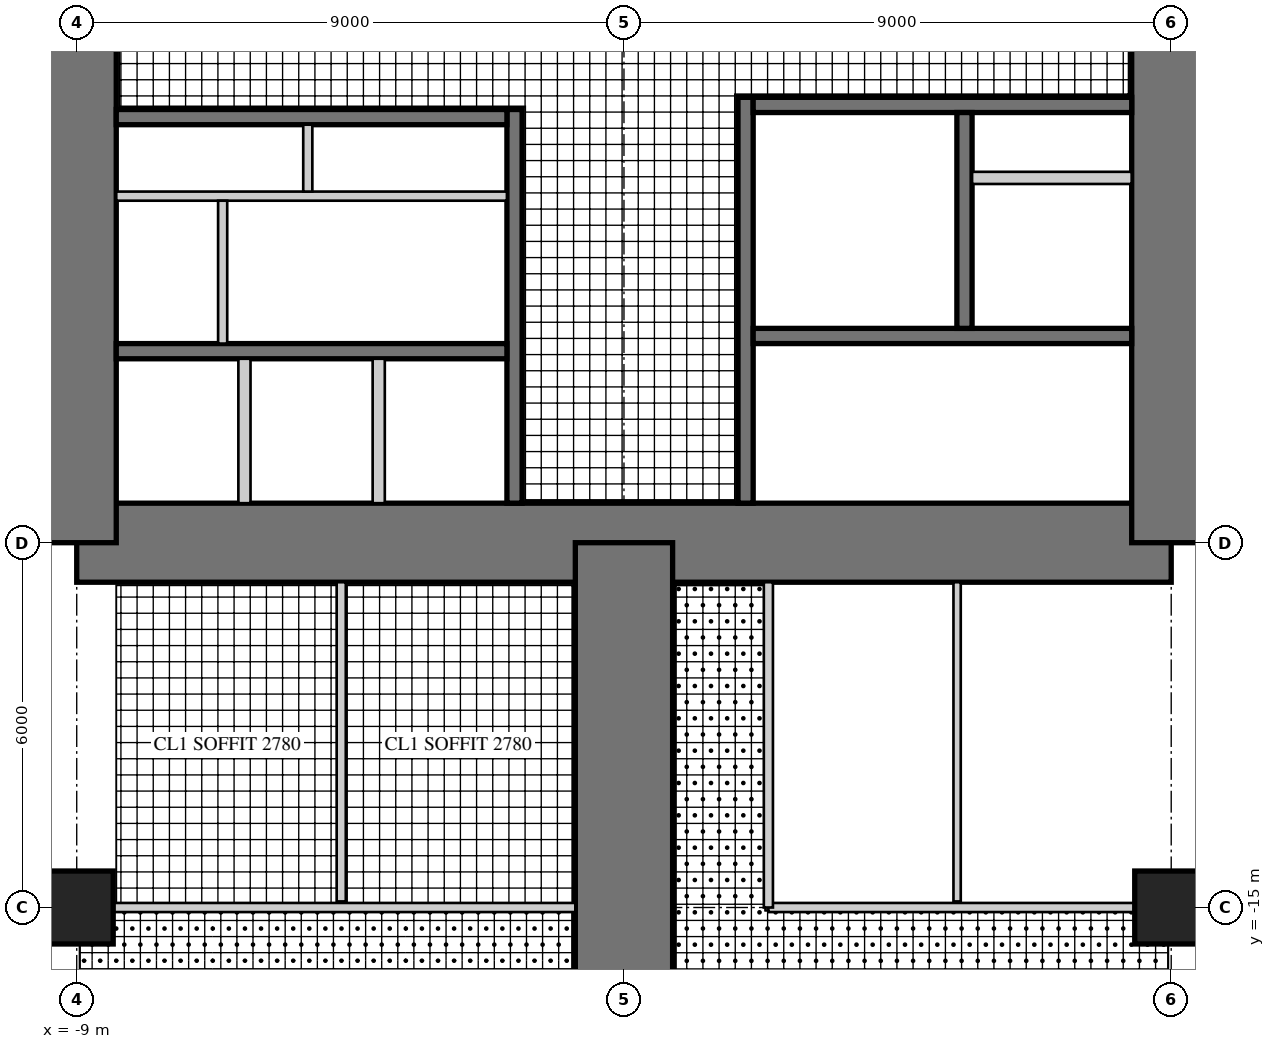
"""IFC4 building model, lengths in metres.
Left out: names, types, materials, properties, quantities, classifications, styles, units other than length and angle.
Written with IfcOpenShell. Run it as: python <this file> out.ifc"""

import sys

from ifc_helpers import new_model, si_unit, direction, frame, frame_2d, origin, origin_2d, place, context, subcontext, project, spatial, rectangle, extrude, element, fill, save


model = new_model("IFC4")
c1 = context("Model", 3, precision=1e-05, world=origin(), true_north=direction((0.0, 1.0)))
c2 = subcontext(c1, "Body", "Model", "MODEL_VIEW")
j1 = project(units=[si_unit("LENGTHUNIT", "METRE"), si_unit("PLANEANGLEUNIT", "RADIAN")], contexts=[c1])
p1 = place(None, origin())
s1 = spatial("IfcSite", under=j1, at=p1, CompositionType="ELEMENT")
p2 = place(p1, origin())
s2 = spatial("IfcBuilding", under=s1, at=p2, CompositionType="ELEMENT")
p3 = place(p2, frame((0.0, 0.0, 35.5)))
s3 = spatial("IfcBuildingStorey", under=s2, at=p3, CompositionType="ELEMENT", Elevation=35.5)
p4 = place(p3, frame((-9.0, -9.0, 0.0), z_axis=(0.0, 0.0, 1.0), x_axis=(1.0, 0.0, 0.0)))
e1 = element("IfcWall", 1, at=p4, inside=s3, PredefinedType="SHEAR", context=c2, shape_type="SweptSolid", body=[
    extrude(rectangle(XDim=18.0, YDim=1.3, at=frame_2d((9.0, 0.0))), origin(), (0.0, 0.0, 1.0), 4.0),
])
p5 = place(p4, frame((9.8, 0.0, 0.0)))
e2 = element("IfcOpeningElement", 2, at=p5, cuts=e1, PredefinedType="OPENING", context=c2, shape_type="SweptSolid", body=[
    extrude(rectangle(XDim=1.0, YDim=2.4, at=frame_2d((0.5, 1.2))), frame((0.0, 0.66, 0.0), z_axis=(0.0, -1.0, 0.0), x_axis=(1.0, 0.0, 0.0)), (0.0, 0.0, 1.0), 1.32),
])
p6 = place(p3, frame((9.0, -9.0, 0.0), z_axis=(0.0, 0.0, 1.0), x_axis=(0.0, 1.0, 0.0)))
e3 = element("IfcWall", 3, at=p6, inside=s3, PredefinedType="SHEAR", context=c2, shape_type="SweptSolid", body=[
    extrude(rectangle(XDim=18.0, YDim=1.3, at=frame_2d((9.0, 0.0))), origin(), (0.0, 0.0, 1.0), 4.0),
])
p7 = place(p6, frame((9.8, 0.0, 0.0)))
e4 = element("IfcOpeningElement", 4, at=p7, cuts=e3, PredefinedType="OPENING", context=c2, shape_type="SweptSolid", body=[
    extrude(rectangle(XDim=1.0, YDim=2.4, at=frame_2d((0.5, 1.2))), frame((0.0, 0.66, 0.0), z_axis=(0.0, -1.0, 0.0), x_axis=(1.0, 0.0, 0.0)), (0.0, 0.0, 1.0), 1.32),
])
p8 = place(p3, frame((-9.0, 9.0, 0.0), z_axis=(0.0, 0.0, 1.0), x_axis=(0.0, -1.0, 0.0)))
e5 = element("IfcWall", 5, at=p8, inside=s3, PredefinedType="SHEAR", context=c2, shape_type="SweptSolid", body=[
    extrude(rectangle(XDim=18.0, YDim=1.3, at=frame_2d((9.0, 0.0))), origin(), (0.0, 0.0, 1.0), 4.0),
])
p9 = place(p8, frame((9.8, 0.0, 0.0)))
e6 = element("IfcOpeningElement", 6, at=p9, cuts=e5, PredefinedType="OPENING", context=c2, shape_type="SweptSolid", body=[
    extrude(rectangle(XDim=1.0, YDim=2.4, at=frame_2d((0.5, 1.2))), frame((0.0, 0.66, 0.0), z_axis=(0.0, -1.0, 0.0), x_axis=(1.0, 0.0, 0.0)), (0.0, 0.0, 1.0), 1.32),
])
p10 = place(p3, frame((-1.8, -1.875, 0.0), z_axis=(0.0, 0.0, 1.0), x_axis=(0.0, -1.0, 0.0)))
e7 = element("IfcWall", 7, at=p10, inside=s3, PredefinedType="SHEAR", context=c2, shape_type="SweptSolid", body=[
    extrude(rectangle(XDim=6.475, YDim=0.25, at=frame_2d((3.238, 0.0))), origin(), (0.0, 0.0, 1.0), 4.0),
])
p11 = place(p10, frame((1.875, 0.0, 0.0)))
e8 = element("IfcOpeningElement", 8, at=p11, cuts=e7, PredefinedType="OPENING", context=c2, shape_type="SweptSolid", body=[
    extrude(rectangle(XDim=1.6, YDim=2.4, at=frame_2d((0.8, 1.2))), frame((0.0, 0.135, 0.0), z_axis=(0.0, -1.0, 0.0), x_axis=(1.0, 0.0, 0.0)), (0.0, 0.0, 1.0), 0.27),
])
for number, where, z_axis, x_axis in (
    (9, (-1.925, -2.0, 0.0), (0.0, 0.0, 1.0), (-1.0, 0.0, 0.0)),
    (10, (-1.925, -5.85, 0.0), (0.0, 0.0, 1.0), (-1.0, 0.0, 0.0)),
):
    element("IfcWall", number, at=place(p3, frame(where, z_axis=z_axis, x_axis=x_axis)), inside=s3, PredefinedType="SHEAR", context=c2, shape_type="SweptSolid", body=[
        extrude(rectangle(XDim=6.425, YDim=0.25, at=frame_2d((3.212, 0.0))), origin(), (0.0, 0.0, 1.0), 4.0),
    ])
p12 = place(p3, frame((-1.925, -3.3, 0.0), z_axis=(0.0, 0.0, 1.0), x_axis=(-1.0, 0.0, 0.0)))
e11 = element("IfcWall", 11, at=p12, inside=s3, PredefinedType="PARTITIONING", context=c2, shape_type="SweptSolid", body=[
    extrude(rectangle(XDim=6.425, YDim=0.15, at=frame_2d((3.212, 0.0))), origin(), (0.0, 0.0, 1.0), 4.0),
])
p13 = place(p12, frame((0.075, 0.0, 0.0)))
e12 = element("IfcOpeningElement", 12, at=p13, cuts=e11, PredefinedType="OPENING", context=c2, shape_type="SweptSolid", body=[
    extrude(rectangle(XDim=0.8, YDim=2.1, at=frame_2d((0.4, 1.05))), frame((0.0, 0.085, 0.0), z_axis=(0.0, -1.0, 0.0), x_axis=(1.0, 0.0, 0.0)), (0.0, 0.0, 1.0), 0.17),
])
p14 = place(p12, frame((3.675, 0.0, 0.0)))
e13 = element("IfcOpeningElement", 13, at=p14, cuts=e11, PredefinedType="OPENING", context=c2, shape_type="SweptSolid", body=[
    extrude(rectangle(XDim=0.8, YDim=2.1, at=frame_2d((0.4, 1.05))), frame((0.0, 0.085, 0.0), z_axis=(0.0, -1.0, 0.0), x_axis=(1.0, 0.0, 0.0)), (0.0, 0.0, 1.0), 0.17),
])
p15 = place(p3, frame((-5.2, -2.125, 0.0), z_axis=(0.0, 0.0, 1.0), x_axis=(0.0, -1.0, 0.0)))
e14 = element("IfcWall", 14, at=p15, inside=s3, PredefinedType="PARTITIONING", context=c2, shape_type="SweptSolid", body=[
    extrude(rectangle(XDim=1.1, YDim=0.15, at=frame_2d((0.55, 0.0))), origin(), (0.0, 0.0, 1.0), 4.0),
])
for number, where, z_axis, x_axis in (
    (15, (-4.033, -5.975, 0.0), (0.0, 0.0, 1.0), (0.0, -1.0, 0.0)),
    (16, (-6.242, -5.975, 0.0), (0.0, 0.0, 1.0), (0.0, -1.0, 0.0)),
):
    element("IfcWall", number, at=place(p3, frame(where, z_axis=z_axis, x_axis=x_axis)), inside=s3, PredefinedType="PARTITIONING", context=c2, shape_type="SweptSolid", body=[
        extrude(rectangle(XDim=2.375, YDim=0.2, at=frame_2d((1.188, 0.0))), origin(), (0.0, 0.0, 1.0), 4.0),
    ])
p16 = place(p3, frame((2.0, -1.675, 0.0), z_axis=(0.0, 0.0, 1.0), x_axis=(0.0, -1.0, 0.0)))
e17 = element("IfcWall", 17, at=p16, inside=s3, PredefinedType="SHEAR", context=c2, shape_type="SweptSolid", body=[
    extrude(rectangle(XDim=6.675, YDim=0.25, at=frame_2d((3.337, 0.0))), origin(), (0.0, 0.0, 1.0), 4.0),
])
p17 = place(p16, frame((0.725, 0.0, 0.0)))
e18 = element("IfcOpeningElement", 18, at=p17, cuts=e17, PredefinedType="OPENING", context=c2, shape_type="SweptSolid", body=[
    extrude(rectangle(XDim=1.0, YDim=2.1, at=frame_2d((0.5, 1.05))), frame((0.0, 0.135, 0.0), z_axis=(0.0, -1.0, 0.0), x_axis=(1.0, 0.0, 0.0)), (0.0, 0.0, 1.0), 0.27),
])
p18 = place(p3, frame((2.125, -1.8, 0.0), z_axis=(0.0, 0.0, 1.0), x_axis=(1.0, 0.0, 0.0)))
e19 = element("IfcWall", 19, at=p18, inside=s3, PredefinedType="SHEAR", context=c2, shape_type="SweptSolid", body=[
    extrude(rectangle(XDim=6.225, YDim=0.25, at=frame_2d((3.113, 0.0))), origin(), (0.0, 0.0, 1.0), 4.0),
])
p19 = place(p3, frame((2.125, -5.6, 0.0), z_axis=(0.0, 0.0, 1.0), x_axis=(1.0, 0.0, 0.0)))
e20 = element("IfcWall", 20, at=p19, inside=s3, PredefinedType="SHEAR", context=c2, shape_type="SweptSolid", body=[
    extrude(rectangle(XDim=6.225, YDim=0.25, at=frame_2d((3.113, 0.0))), origin(), (0.0, 0.0, 1.0), 4.0),
])
p20 = place(p19, frame((0.175, 0.0, 0.0)))
e21 = element("IfcOpeningElement", 21, at=p20, cuts=e20, PredefinedType="OPENING", context=c2, shape_type="SweptSolid", body=[
    extrude(rectangle(XDim=1.0, YDim=2.1, at=frame_2d((0.5, 1.05))), frame((0.0, 0.135, 0.0), z_axis=(0.0, -1.0, 0.0), x_axis=(1.0, 0.0, 0.0)), (0.0, 0.0, 1.0), 0.27),
])
p21 = place(p3, frame((5.6, -1.925, 0.0), z_axis=(0.0, 0.0, 1.0), x_axis=(0.0, -1.0, 0.0)))
e22 = element("IfcWall", 22, at=p21, inside=s3, PredefinedType="SHEAR", context=c2, shape_type="SweptSolid", body=[
    extrude(rectangle(XDim=3.55, YDim=0.25, at=frame_2d((1.775, 0.0))), origin(), (0.0, 0.0, 1.0), 4.0),
])
p22 = place(p21, frame((1.525, 0.0, 0.0)))
e23 = element("IfcOpeningElement", 23, at=p22, cuts=e22, PredefinedType="OPENING", context=c2, shape_type="SweptSolid", body=[
    extrude(rectangle(XDim=1.1, YDim=2.2, at=frame_2d((0.55, 1.1))), frame((0.0, 0.135, 0.0), z_axis=(0.0, -1.0, 0.0), x_axis=(1.0, 0.0, 0.0)), (0.0, 0.0, 1.0), 0.27),
])
p23 = place(p21, frame((0.075, 0.0, 0.0)))
e24 = element("IfcOpeningElement", 24, at=p23, cuts=e22, PredefinedType="OPENING", context=c2, shape_type="SweptSolid", body=[
    extrude(rectangle(XDim=0.8, YDim=2.1, at=frame_2d((0.4, 1.05))), frame((0.0, 0.135, 0.0), z_axis=(0.0, -1.0, 0.0), x_axis=(1.0, 0.0, 0.0)), (0.0, 0.0, 1.0), 0.27),
])
p24 = place(p3, frame((5.725, -3.0, 0.0), z_axis=(0.0, 0.0, 1.0), x_axis=(1.0, 0.0, 0.0)))
e25 = element("IfcWall", 25, at=p24, inside=s3, PredefinedType="PARTITIONING", context=c2, shape_type="SweptSolid", body=[
    extrude(rectangle(XDim=2.625, YDim=0.2, at=frame_2d((1.312, 0.0))), origin(), (0.0, 0.0, 1.0), 4.0),
])
p25 = place(p3, frame((0.0, -9.0, 0.0), z_axis=(0.0, 0.0, 1.0), x_axis=(0.0, -1.0, 0.0)))
e26 = element("IfcWall", 26, at=p25, inside=s3, PredefinedType="SHEAR", context=c2, shape_type="SweptSolid", body=[
    extrude(rectangle(XDim=18.0, YDim=1.6, at=frame_2d((9.0, 0.0))), origin(), (0.0, 0.0, 1.0), 4.0),
])
p26 = place(p25, frame((9.9, 0.0, 0.0)))
e27 = element("IfcOpeningElement", 27, at=p26, cuts=e26, PredefinedType="OPENING", context=c2, shape_type="SweptSolid", body=[
    extrude(rectangle(XDim=1.0, YDim=2.2, at=frame_2d((0.5, 1.1))), frame((0.0, 0.81, 0.0), z_axis=(0.0, -1.0, 0.0), x_axis=(1.0, 0.0, 0.0)), (0.0, 0.0, 1.0), 1.62),
])
for number, where, z_axis, x_axis in (
    (28, (-9.0, -15.0, 0.0), (0.0, 0.0, 1.0), (1.0, 0.0, 0.0)),
    (29, (9.0, -15.0, 0.0), (0.0, 0.0, 1.0), (1.0, 0.0, 0.0)),
):
    element("IfcColumn", number, at=place(p3, frame(where, z_axis=z_axis, x_axis=x_axis)), inside=s3, PredefinedType="COLUMN", context=c2, shape_type="SweptSolid", body=[
        extrude(rectangle(XDim=1.2, YDim=1.2, at=origin_2d()), origin(), (0.0, 0.0, 1.0), 4.0),
    ])
p27 = place(p3, frame((-6.6, -3.375, 0.0), z_axis=(0.0, 0.0, 1.0), x_axis=(0.0, -1.0, 0.0)))
e30 = element("IfcWall", 30, at=p27, inside=s3, PredefinedType="PARTITIONING", context=c2, shape_type="SweptSolid", body=[
    extrude(rectangle(XDim=2.35, YDim=0.15, at=frame_2d((1.175, 0.0))), origin(), (0.0, 0.0, 1.0), 3.8),
])
p28 = place(p27, frame((0.45, 0.0, 0.0)))
e31 = element("IfcOpeningElement", 31, at=p28, cuts=e30, PredefinedType="OPENING", context=c2, shape_type="SweptSolid", body=[
    extrude(rectangle(XDim=1.0, YDim=2.1, at=frame_2d((0.5, 1.05))), frame((0.0, 0.085, 0.0), z_axis=(0.0, -1.0, 0.0), x_axis=(1.0, 0.0, 0.0)), (0.0, 0.0, 1.0), 0.17),
])
p29 = place(p3, frame((2.375, -15.0, 0.0), z_axis=(0.0, 0.0, 1.0), x_axis=(1.0, 0.0, 0.0)))
e32 = element("IfcWall", 32, at=p29, inside=s3, PredefinedType="PARTITIONING", context=c2, shape_type="SweptSolid", body=[
    extrude(rectangle(XDim=6.025, YDim=0.15, at=frame_2d((3.012, 0.0))), origin(), (0.0, 0.0, 1.0), 2.95),
])
p30 = place(p29, frame((1.052, 0.0, 0.0)))
e33 = element("IfcOpeningElement", 33, at=p30, cuts=e32, PredefinedType="OPENING", context=c2, shape_type="SweptSolid", body=[
    extrude(rectangle(XDim=1.0, YDim=2.1, at=frame_2d((0.5, 1.05))), frame((0.0, 0.085, 0.0), z_axis=(0.0, -1.0, 0.0), x_axis=(1.0, 0.0, 0.0)), (0.0, 0.0, 1.0), 0.17),
])
p31 = place(p29, frame((4.064, 0.0, 0.0)))
e34 = element("IfcOpeningElement", 34, at=p31, cuts=e32, PredefinedType="OPENING", context=c2, shape_type="SweptSolid", body=[
    extrude(rectangle(XDim=1.0, YDim=2.1, at=frame_2d((0.5, 1.05))), frame((0.0, 0.085, 0.0), z_axis=(0.0, -1.0, 0.0), x_axis=(1.0, 0.0, 0.0)), (0.0, 0.0, 1.0), 0.17),
])
p32 = place(p3, frame((2.375, -9.65, 0.0), z_axis=(0.0, 0.0, 1.0), x_axis=(0.0, -1.0, 0.0)))
e35 = element("IfcWall", 35, at=p32, inside=s3, PredefinedType="PARTITIONING", context=c2, shape_type="SweptSolid", body=[
    extrude(rectangle(XDim=5.35, YDim=0.15, at=frame_2d((2.675, 0.0))), origin(), (0.0, 0.0, 1.0), 3.8),
])
p33 = place(p3, frame((5.479, -9.65, 0.0), z_axis=(0.0, 0.0, 1.0), x_axis=(0.0, -1.0, 0.0)))
e36 = element("IfcWall", 36, at=p33, inside=s3, PredefinedType="PLUMBINGWALL", context=c2, shape_type="SweptSolid", body=[
    extrude(rectangle(XDim=5.25, YDim=0.12, at=frame_2d((2.625, 0.0))), origin(), (0.0, 0.0, 1.0), 3.8),
])
p34 = place(p3, frame((-8.4, -15.0, 0.0), z_axis=(0.0, 0.0, 1.0), x_axis=(1.0, 0.0, 0.0)))
e37 = element("IfcWall", 37, at=p34, inside=s3, PredefinedType="PARTITIONING", context=c2, shape_type="SweptSolid", body=[
    extrude(rectangle(XDim=7.6, YDim=0.15, at=frame_2d((3.8, 0.0))), origin(), (0.0, 0.0, 1.0), 2.95),
])
p35 = place(p34, frame((1.375, 0.0, 0.0)))
e38 = element("IfcOpeningElement", 38, at=p35, cuts=e37, PredefinedType="OPENING", context=c2, shape_type="SweptSolid", body=[
    extrude(rectangle(XDim=1.0, YDim=2.1, at=frame_2d((0.5, 1.05))), frame((0.0, 0.085, 0.0), z_axis=(0.0, -1.0, 0.0), x_axis=(1.0, 0.0, 0.0)), (0.0, 0.0, 1.0), 0.17),
])
p36 = place(p34, frame((5.175, 0.0, 0.0)))
e39 = element("IfcOpeningElement", 39, at=p36, cuts=e37, PredefinedType="OPENING", context=c2, shape_type="SweptSolid", body=[
    extrude(rectangle(XDim=1.0, YDim=2.1, at=frame_2d((0.5, 1.05))), frame((0.0, 0.085, 0.0), z_axis=(0.0, -1.0, 0.0), x_axis=(1.0, 0.0, 0.0)), (0.0, 0.0, 1.0), 0.17),
])
p37 = place(p3, frame((-4.65, -9.65, 0.0), z_axis=(0.0, 0.0, 1.0), x_axis=(0.0, -1.0, 0.0)))
e40 = element("IfcWall", 40, at=p37, inside=s3, PredefinedType="PARTITIONING", context=c2, shape_type="SweptSolid", body=[
    extrude(rectangle(XDim=5.25, YDim=0.15, at=frame_2d((2.625, 0.0))), origin(), (0.0, 0.0, 1.0), 3.8),
])
p38 = place(p28, frame((1.0, 0.0, 0.0), z_axis=(0.0, 0.0, 1.0), x_axis=(-1.0, 0.0, 0.0)))
e41 = element("IfcDoor", 41, at=p38, inside=s3, OperationType="SINGLE_SWING_RIGHT", PredefinedType="DOOR", context=c2, shape_type="SweptSolid", body=[
    extrude(rectangle(XDim=1.0, YDim=2.1, at=frame_2d((0.5, 1.05))), frame((0.0, 0.025, 0.0), z_axis=(0.0, -1.0, 0.0), x_axis=(1.0, 0.0, 0.0)), (0.0, 0.0, 1.0), 0.05),
])
fill(e31, e41)
p39 = place(p30, origin())
e42 = element("IfcDoor", 42, at=p39, inside=s3, OperationType="SINGLE_SWING_LEFT", PredefinedType="DOOR", context=c2, shape_type="SweptSolid", body=[
    extrude(rectangle(XDim=1.0, YDim=2.1, at=frame_2d((0.5, 1.05))), frame((0.0, 0.025, 0.0), z_axis=(0.0, -1.0, 0.0), x_axis=(1.0, 0.0, 0.0)), (0.0, 0.0, 1.0), 0.05),
])
fill(e33, e42)
p40 = place(p31, origin())
e43 = element("IfcDoor", 43, at=p40, inside=s3, OperationType="SINGLE_SWING_LEFT", PredefinedType="DOOR", context=c2, shape_type="SweptSolid", body=[
    extrude(rectangle(XDim=1.0, YDim=2.1, at=frame_2d((0.5, 1.05))), frame((0.0, 0.025, 0.0), z_axis=(0.0, -1.0, 0.0), x_axis=(1.0, 0.0, 0.0)), (0.0, 0.0, 1.0), 0.05),
])
fill(e34, e43)
p41 = place(p35, origin())
e44 = element("IfcDoor", 44, at=p41, inside=s3, OperationType="SINGLE_SWING_RIGHT", PredefinedType="DOOR", context=c2, shape_type="SweptSolid", body=[
    extrude(rectangle(XDim=1.0, YDim=2.1, at=frame_2d((0.5, 1.05))), frame((0.0, 0.025, 0.0), z_axis=(0.0, -1.0, 0.0), x_axis=(1.0, 0.0, 0.0)), (0.0, 0.0, 1.0), 0.05),
])
fill(e38, e44)
p42 = place(p36, origin())
e45 = element("IfcDoor", 45, at=p42, inside=s3, OperationType="SINGLE_SWING_LEFT", PredefinedType="DOOR", context=c2, shape_type="SweptSolid", body=[
    extrude(rectangle(XDim=1.0, YDim=2.1, at=frame_2d((0.5, 1.05))), frame((0.0, 0.025, 0.0), z_axis=(0.0, -1.0, 0.0), x_axis=(1.0, 0.0, 0.0)), (0.0, 0.0, 1.0), 0.05),
])
fill(e39, e45)
p43 = place(p5, frame((1.0, 0.0, 0.0), z_axis=(0.0, 0.0, 1.0), x_axis=(-1.0, 0.0, 0.0)))
e46 = element("IfcDoor", 46, at=p43, inside=s3, OperationType="SINGLE_SWING_RIGHT", PredefinedType="DOOR", context=c2, shape_type="SweptSolid", body=[
    extrude(rectangle(XDim=1.0, YDim=2.4, at=frame_2d((0.5, 1.2))), frame((0.0, -0.005, 0.0), z_axis=(0.0, -1.0, 0.0), x_axis=(1.0, 0.0, 0.0)), (0.0, 0.0, 1.0), 0.05),
])
fill(e2, e46)
p44 = place(p9, frame((1.0, 0.0, 0.0), z_axis=(0.0, 0.0, 1.0), x_axis=(-1.0, 0.0, 0.0)))
e47 = element("IfcDoor", 47, at=p44, inside=s3, OperationType="SINGLE_SWING_RIGHT", PredefinedType="DOOR", context=c2, shape_type="SweptSolid", body=[
    extrude(rectangle(XDim=1.0, YDim=2.4, at=frame_2d((0.5, 1.2))), frame((0.0, -0.005, 0.0), z_axis=(0.0, -1.0, 0.0), x_axis=(1.0, 0.0, 0.0)), (0.0, 0.0, 1.0), 0.05),
])
fill(e6, e47)
p45 = place(p11, frame((1.6, 0.0, 0.0), z_axis=(0.0, 0.0, 1.0), x_axis=(-1.0, 0.0, 0.0)))
e48 = element("IfcDoor", 48, at=p45, inside=s3, OperationType="DOUBLE_DOOR_SINGLE_SWING", PredefinedType="DOOR", context=c2, shape_type="SweptSolid", body=[
    extrude(rectangle(XDim=1.6, YDim=2.4, at=frame_2d((0.8, 1.2))), frame((0.0, 0.025, 0.0), z_axis=(0.0, -1.0, 0.0), x_axis=(1.0, 0.0, 0.0)), (0.0, 0.0, 1.0), 0.05),
])
fill(e8, e48)
p46 = place(p13, frame((0.8, 0.0, 0.0), z_axis=(0.0, 0.0, 1.0), x_axis=(-1.0, 0.0, 0.0)))
e49 = element("IfcDoor", 49, at=p46, inside=s3, OperationType="SINGLE_SWING_RIGHT", PredefinedType="DOOR", context=c2, shape_type="SweptSolid", body=[
    extrude(rectangle(XDim=0.8, YDim=2.1, at=frame_2d((0.4, 1.05))), frame((0.0, 0.025, 0.0), z_axis=(0.0, -1.0, 0.0), x_axis=(1.0, 0.0, 0.0)), (0.0, 0.0, 1.0), 0.05),
])
fill(e12, e49)
p47 = place(p14, frame((0.8, 0.0, 0.0), z_axis=(0.0, 0.0, 1.0), x_axis=(-1.0, 0.0, 0.0)))
e50 = element("IfcDoor", 50, at=p47, inside=s3, OperationType="SINGLE_SWING_RIGHT", PredefinedType="DOOR", context=c2, shape_type="SweptSolid", body=[
    extrude(rectangle(XDim=0.8, YDim=2.1, at=frame_2d((0.4, 1.05))), frame((0.0, 0.025, 0.0), z_axis=(0.0, -1.0, 0.0), x_axis=(1.0, 0.0, 0.0)), (0.0, 0.0, 1.0), 0.05),
])
fill(e13, e50)
p48 = place(p17, origin())
e51 = element("IfcDoor", 51, at=p48, inside=s3, OperationType="SINGLE_SWING_LEFT", PredefinedType="DOOR", context=c2, shape_type="SweptSolid", body=[
    extrude(rectangle(XDim=1.0, YDim=2.1, at=frame_2d((0.5, 1.05))), frame((0.0, 0.025, 0.0), z_axis=(0.0, -1.0, 0.0), x_axis=(1.0, 0.0, 0.0)), (0.0, 0.0, 1.0), 0.05),
])
fill(e18, e51)
p49 = place(p20, frame((1.0, 0.0, 0.0), z_axis=(0.0, 0.0, 1.0), x_axis=(-1.0, 0.0, 0.0)))
e52 = element("IfcDoor", 52, at=p49, inside=s3, OperationType="SINGLE_SWING_RIGHT", PredefinedType="DOOR", context=c2, shape_type="SweptSolid", body=[
    extrude(rectangle(XDim=1.0, YDim=2.1, at=frame_2d((0.5, 1.05))), frame((0.0, 0.025, 0.0), z_axis=(0.0, -1.0, 0.0), x_axis=(1.0, 0.0, 0.0)), (0.0, 0.0, 1.0), 0.05),
])
fill(e21, e52)
p50 = place(p22, origin())
e53 = element("IfcDoor", 53, at=p50, inside=s3, OperationType="DOUBLE_DOOR_SLIDING", PredefinedType="DOOR", context=c2, shape_type="SweptSolid", body=[
    extrude(rectangle(XDim=1.1, YDim=2.2, at=frame_2d((0.55, 1.1))), frame((0.0, 0.025, 0.0), z_axis=(0.0, -1.0, 0.0), x_axis=(1.0, 0.0, 0.0)), (0.0, 0.0, 1.0), 0.05),
])
fill(e23, e53)
p51 = place(p23, origin())
e54 = element("IfcDoor", 54, at=p51, inside=s3, OperationType="SINGLE_SWING_LEFT", PredefinedType="DOOR", context=c2, shape_type="SweptSolid", body=[
    extrude(rectangle(XDim=0.8, YDim=2.1, at=frame_2d((0.4, 1.05))), frame((0.0, 0.025, 0.0), z_axis=(0.0, -1.0, 0.0), x_axis=(1.0, 0.0, 0.0)), (0.0, 0.0, 1.0), 0.05),
])
fill(e24, e54)
save(model, sys.argv[1])
